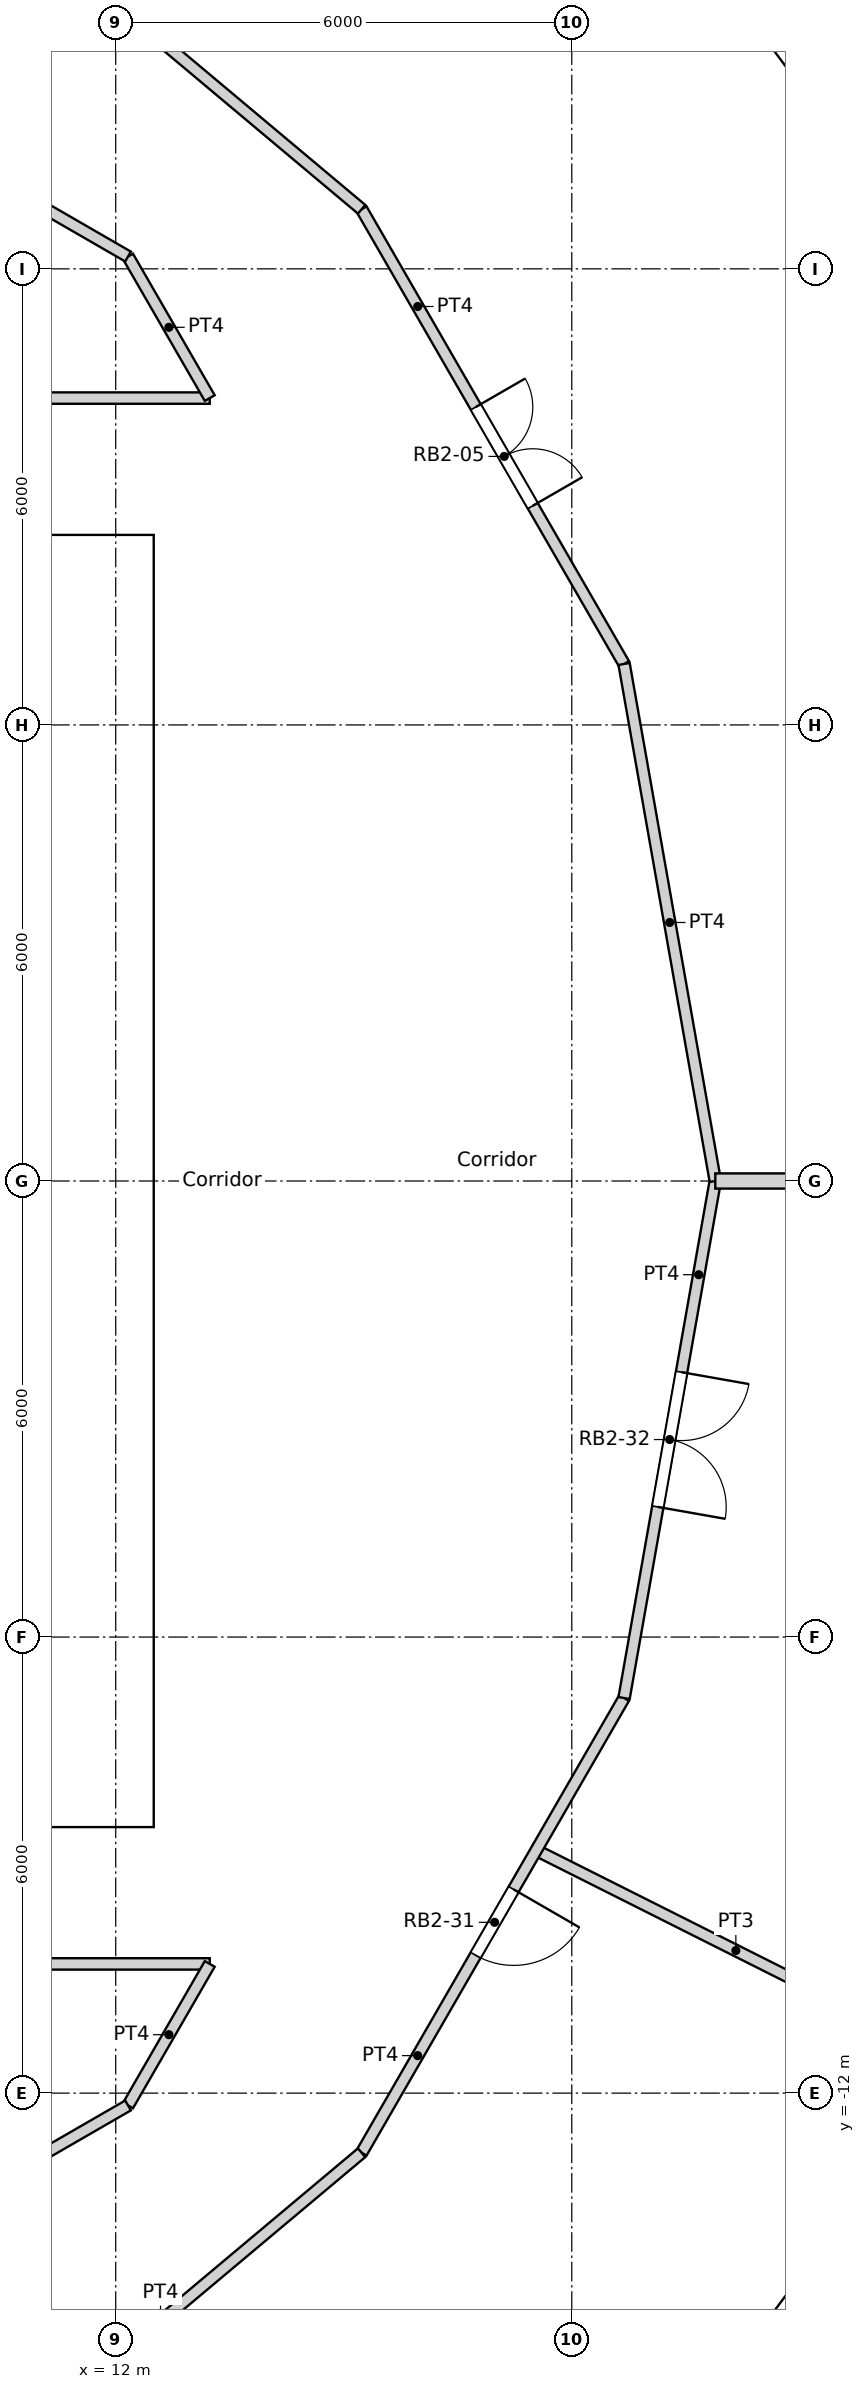
"""IFC4 building model, lengths in metres.
Left out: names, types, materials, properties, quantities, classifications, styles, units other than length and angle.
Written with IfcOpenShell. Run it as: python <this file> out.ifc"""

import sys

from ifc_helpers import new_model, si_unit, direction, frame, frame_2d, origin, origin_2d, place, context, subcontext, project, spatial, rectangle, circle, extrude, element, fill, save


model = new_model("IFC4")
c1 = context("Model", 3, precision=1e-05, world=origin(), true_north=direction((0.0, 1.0)))
c2 = subcontext(c1, "Body", "Model", "MODEL_VIEW")
j1 = project(units=[si_unit("LENGTHUNIT", "METRE"), si_unit("PLANEANGLEUNIT", "RADIAN")], contexts=[c1])
p1 = place(None, origin())
s1 = spatial("IfcSite", under=j1, at=p1, CompositionType="ELEMENT")
p2 = place(p1, origin())
s2 = spatial("IfcBuilding", under=s1, at=p2, CompositionType="ELEMENT")
p3 = place(p2, frame((0.0, 0.0, 136.8)))
s3 = spatial("IfcBuildingStorey", under=s2, at=p3, CompositionType="ELEMENT", Elevation=136.8)
for number, where, z_axis, x_axis in (
    (1, (18.822, 0.0, 0.0), (0.0, 0.0, 1.0), (1.0, 0.0, 0.0)),
    (2, (17.986, 5.548, 0.0), (0.0, 0.0, 1.0), (1.0, 0.0, 0.0)),
    (3, (15.552, 10.603, 0.0), (0.0, 0.0, 1.0), (1.0, 0.0, 0.0)),
    (4, (11.735, 14.716, 0.0), (0.0, 0.0, 1.0), (1.0, 0.0, 0.0)),
    (5, (11.735, -14.716, 0.0), (0.0, 0.0, 1.0), (1.0, 0.0, 0.0)),
    (6, (15.552, -10.603, 0.0), (0.0, 0.0, 1.0), (1.0, 0.0, 0.0)),
    (7, (17.986, -5.548, 0.0), (0.0, 0.0, 1.0), (1.0, 0.0, 0.0)),
):
    element("IfcColumn", number, at=place(p3, frame(where, z_axis=z_axis, x_axis=x_axis)), inside=s3, PredefinedType="COLUMN", context=c2, shape_type="SweptSolid", body=[
        extrude(circle(Radius=0.65, at=origin_2d()), origin(), (0.0, 0.0, 1.0), 3.6),
    ])
p4 = place(p3, frame((21.895, 14.43, -0.3), z_axis=(0.0, 0.0, 1.0), x_axis=(-0.597183717734, 0.802104486506, 0.0)))
e8 = element("IfcWall", 8, at=p4, inside=s3, PredefinedType="ELEMENTEDWALL", context=c2, shape_type="SweptSolid", body=[
    extrude(rectangle(XDim=3.0, YDim=1.45, at=frame_2d((1.5, 0.0))), origin(), (0.0, 0.0, 1.0), 3.6),
])
p5 = place(p4, frame((1.5, 0.0, 1.85)))
e9 = element("IfcOpeningElement", 9, at=p5, cuts=e8, PredefinedType="OPENING", context=c2, shape_type="SweptSolid", body=[
    extrude(circle(Radius=0.9, at=origin_2d()), frame((0.0, 0.735, 0.0), z_axis=(0.0, -1.0, 0.0), x_axis=(1.0, 0.0, 0.0)), (0.0, 0.0, 1.0), 1.47),
])
p6 = place(p3, frame((19.653, -16.478, 0.0), z_axis=(0.0, 0.0, 1.0), x_axis=(0.597197580538, 0.80209416517, 0.0)))
e10 = element("IfcWall", 10, at=p6, inside=s3, PredefinedType="SOLIDWALL", context=c2, shape_type="SweptSolid", body=[
    extrude(rectangle(XDim=2.973, YDim=0.3, at=frame_2d((1.486, 0.0))), origin(), (0.0, 0.0, 1.0), 2.8),
])
p7 = place(p6, frame((1.486, 0.0, 1.55)))
e11 = element("IfcOpeningElement", 11, at=p7, cuts=e10, PredefinedType="OPENING", context=c2, shape_type="SweptSolid", body=[
    extrude(circle(Radius=0.9, at=origin_2d()), frame((0.0, 0.16, 0.0), z_axis=(0.0, -1.0, 0.0), x_axis=(1.0, 0.0, 0.0)), (0.0, 0.0, 1.0), 0.32),
])
p8 = place(p3, frame((-12.5, -8.05, 0.0), z_axis=(0.0, 0.0, 1.0), x_axis=(1.0, 0.0, 0.0)))
e12 = element("IfcWall", 12, at=p8, inside=s3, PredefinedType="SOLIDWALL", context=c2, shape_type="SweptSolid", body=[
    extrude(rectangle(XDim=25.0, YDim=0.9, at=frame_2d((12.5, 0.0))), origin(), (0.0, 0.0, 1.0), 3.6),
])
p9 = place(p8, frame((13.4, 0.0, 0.0)))
e13 = element("IfcOpeningElement", 13, at=p9, cuts=e12, PredefinedType="OPENING", context=c2, shape_type="SweptSolid", body=[
    extrude(rectangle(XDim=1.0, YDim=2.1, at=frame_2d((0.5, 1.05))), frame((0.0, 0.45, 0.0), z_axis=(0.0, -1.0, 0.0), x_axis=(1.0, 0.0, 0.0)), (0.0, 0.0, 1.0), 0.9),
])
p10 = place(p8, frame((8.3, 0.0, 0.0)))
e14 = element("IfcOpeningElement", 14, at=p10, cuts=e12, PredefinedType="OPENING", context=c2, shape_type="SweptSolid", body=[
    extrude(rectangle(XDim=1.8, YDim=2.1, at=frame_2d((0.9, 1.05))), frame((0.0, 0.45, 0.0), z_axis=(0.0, -1.0, 0.0), x_axis=(1.0, 0.0, 0.0)), (0.0, 0.0, 1.0), 0.9),
])
p11 = place(p8, frame((14.9, 0.0, 0.0)))
e15 = element("IfcOpeningElement", 15, at=p11, cuts=e12, PredefinedType="OPENING", context=c2, shape_type="SweptSolid", body=[
    extrude(rectangle(XDim=1.8, YDim=2.1, at=frame_2d((0.9, 1.05))), frame((0.0, 0.45, 0.0), z_axis=(0.0, -1.0, 0.0), x_axis=(1.0, 0.0, 0.0)), (0.0, 0.0, 1.0), 0.9),
])
p12 = place(p3, frame((-12.5, 8.05, 0.0), z_axis=(0.0, 0.0, 1.0), x_axis=(1.0, 0.0, 0.0)))
e16 = element("IfcWall", 16, at=p12, inside=s3, PredefinedType="SOLIDWALL", context=c2, shape_type="SweptSolid", body=[
    extrude(rectangle(XDim=25.0, YDim=0.9, at=frame_2d((12.5, 0.0))), origin(), (0.0, 0.0, 1.0), 3.6),
])
p13 = place(p12, frame((8.3, 0.0, 0.0)))
e17 = element("IfcOpeningElement", 17, at=p13, cuts=e16, PredefinedType="OPENING", context=c2, shape_type="SweptSolid", body=[
    extrude(rectangle(XDim=1.8, YDim=2.1, at=frame_2d((0.9, 1.05))), frame((0.0, 0.45, 0.0), z_axis=(0.0, -1.0, 0.0), x_axis=(1.0, 0.0, 0.0)), (0.0, 0.0, 1.0), 0.9),
])
p14 = place(p3, frame((12.05, -7.6, 0.0), z_axis=(0.0, 0.0, 1.0), x_axis=(0.0, 1.0, 0.0)))
e18 = element("IfcWall", 18, at=p14, inside=s3, PredefinedType="SOLIDWALL", context=c2, shape_type="SweptSolid", body=[
    extrude(rectangle(XDim=15.2, YDim=0.9, at=frame_2d((7.6, 0.0))), origin(), (0.0, 0.0, 1.0), 3.6),
])
p15 = place(p14, frame((5.1, 0.0, 0.0)))
e19 = element("IfcOpeningElement", 19, at=p15, cuts=e18, PredefinedType="OPENING", context=c2, shape_type="SweptSolid", body=[
    extrude(rectangle(XDim=1.0, YDim=2.1, at=frame_2d((0.5, 1.05))), frame((0.0, 0.45, 0.0), z_axis=(0.0, -1.0, 0.0), x_axis=(1.0, 0.0, 0.0)), (0.0, 0.0, 1.0), 0.9),
])
p16 = place(p3, frame((9.2, -4.55, 0.0), z_axis=(0.0, 0.0, 1.0), x_axis=(1.0, 0.0, 0.0)))
e20 = element("IfcWall", 20, at=p16, inside=s3, PredefinedType="SOLIDWALL", context=c2, shape_type="SweptSolid", body=[
    extrude(rectangle(XDim=2.4, YDim=0.3, at=frame_2d((1.2, 0.0))), origin(), (0.0, 0.0, 1.0), 3.3),
])
p17 = place(p16, frame((0.65, 0.0, 0.0)))
e21 = element("IfcOpeningElement", 21, at=p17, cuts=e20, PredefinedType="OPENING", context=c2, shape_type="SweptSolid", body=[
    extrude(rectangle(XDim=1.1, YDim=2.1, at=frame_2d((0.55, 1.05))), frame((0.0, 0.15, 0.0), z_axis=(0.0, -1.0, 0.0), x_axis=(1.0, 0.0, 0.0)), (0.0, 0.0, 1.0), 0.3),
])
p18 = place(p3, frame((9.2, 4.55, 0.0), z_axis=(0.0, 0.0, 1.0), x_axis=(1.0, 0.0, 0.0)))
e22 = element("IfcWall", 22, at=p18, inside=s3, PredefinedType="SOLIDWALL", context=c2, shape_type="SweptSolid", body=[
    extrude(rectangle(XDim=2.4, YDim=0.3, at=frame_2d((1.2, 0.0))), origin(), (0.0, 0.0, 1.0), 3.3),
])
p19 = place(p18, frame((0.65, 0.0, 0.0)))
e23 = element("IfcOpeningElement", 23, at=p19, cuts=e22, PredefinedType="OPENING", context=c2, shape_type="SweptSolid", body=[
    extrude(rectangle(XDim=1.1, YDim=2.1, at=frame_2d((0.55, 1.05))), frame((0.0, 0.15, 0.0), z_axis=(0.0, -1.0, 0.0), x_axis=(1.0, 0.0, 0.0)), (0.0, 0.0, 1.0), 0.3),
])
p20 = place(p3, frame((-3.025, 10.3, 0.0), z_axis=(0.0, 0.0, 1.0), x_axis=(1.0, 0.0, 0.0)))
e24 = element("IfcWall", 24, at=p20, inside=s3, PredefinedType="PARTITIONING", context=c2, shape_type="SweptSolid", body=[
    extrude(rectangle(XDim=16.262, YDim=0.15, at=frame_2d((8.131, 0.0))), origin(), (0.0, 0.0, 1.0), 3.3),
])
p21 = place(p20, frame((7.288, 0.0, 0.0)))
e25 = element("IfcOpeningElement", 25, at=p21, cuts=e24, PredefinedType="OPENING", context=c2, shape_type="SweptSolid", body=[
    extrude(rectangle(XDim=0.95, YDim=2.1, at=frame_2d((0.475, 1.05))), frame((0.0, 0.075, 0.0), z_axis=(0.0, -1.0, 0.0), x_axis=(1.0, 0.0, 0.0)), (0.0, 0.0, 1.0), 0.15),
])
p22 = place(p3, frame((-3.025, -10.3, 0.0), z_axis=(0.0, 0.0, 1.0), x_axis=(1.0, 0.0, 0.0)))
e26 = element("IfcWall", 26, at=p22, inside=s3, PredefinedType="PARTITIONING", context=c2, shape_type="SweptSolid", body=[
    extrude(rectangle(XDim=16.262, YDim=0.15, at=frame_2d((8.131, 0.0))), origin(), (0.0, 0.0, 1.0), 3.3),
])
p23 = place(p22, frame((7.287, 0.0, 0.0)))
e27 = element("IfcOpeningElement", 27, at=p23, cuts=e26, PredefinedType="OPENING", context=c2, shape_type="SweptSolid", body=[
    extrude(rectangle(XDim=0.95, YDim=2.1, at=frame_2d((0.475, 1.05))), frame((0.0, 0.075, 0.0), z_axis=(0.0, -1.0, 0.0), x_axis=(1.0, 0.0, 0.0)), (0.0, 0.0, 1.0), 0.15),
])
for number, where, z_axis, x_axis in (
    (28, (12.162, 12.162, 0.0), (0.0, 0.0, 1.0), (0.5, -0.866, 0.0)),
    (29, (12.162, -12.162, 0.0), (0.0, 0.0, 1.0), (0.5, 0.866, 0.0)),
):
    element("IfcWall", number, at=place(p3, frame(where, z_axis=z_axis, x_axis=x_axis)), inside=s3, PredefinedType="PARTITIONING", context=c2, shape_type="SweptSolid", body=[
        extrude(rectangle(XDim=2.15, YDim=0.15, at=frame_2d((1.075, 0.0))), origin(), (0.0, 0.0, 1.0), 3.3),
    ])
p24 = place(p3, frame((9.943, 17.222, 0.0), z_axis=(0.0, 0.0, 1.0), x_axis=(0.766192104565, -0.642611592567, 0.0)))
e30 = element("IfcWall", 30, at=p24, inside=s3, PredefinedType="PARTITIONING", context=c2, shape_type="SweptSolid", body=[
    extrude(rectangle(XDim=6.906, YDim=0.15, at=frame_2d((3.453, 0.0))), origin(), (0.0, 0.0, 1.0), 3.3),
])
p25 = place(p3, frame((15.235, 12.784, 0.0), z_axis=(0.0, 0.0, 1.0), x_axis=(0.499914202267, -0.866074933462, 0.0)))
e31 = element("IfcWall", 31, at=p25, inside=s3, PredefinedType="PARTITIONING", context=c2, shape_type="SweptSolid", body=[
    extrude(rectangle(XDim=6.907, YDim=0.15, at=frame_2d((3.454, 0.0))), origin(), (0.0, 0.0, 1.0), 3.3),
])
p26 = place(p25, frame((3.004, 0.0, 0.0)))
e32 = element("IfcOpeningElement", 32, at=p26, cuts=e31, PredefinedType="OPENING", context=c2, shape_type="SweptSolid", body=[
    extrude(rectangle(XDim=1.5, YDim=2.1, at=frame_2d((0.75, 1.05))), frame((0.0, 0.075, 0.0), z_axis=(0.0, -1.0, 0.0), x_axis=(1.0, 0.0, 0.0)), (0.0, 0.0, 1.0), 0.15),
])
p27 = place(p3, frame((18.688, 6.802, 0.0), z_axis=(0.0, 0.0, 1.0), x_axis=(0.173728873845, -0.98479352069, 0.0)))
e33 = element("IfcWall", 33, at=p27, inside=s3, PredefinedType="PARTITIONING", context=c2, shape_type="SweptSolid", body=[
    extrude(rectangle(XDim=6.907, YDim=0.15, at=frame_2d((3.454, 0.0))), origin(), (0.0, 0.0, 1.0), 3.3),
])
p28 = place(p3, frame((15.235, -12.784, 0.0), z_axis=(0.0, 0.0, 1.0), x_axis=(0.499914202267, 0.866074933462, 0.0)))
e34 = element("IfcWall", 34, at=p28, inside=s3, PredefinedType="PARTITIONING", context=c2, shape_type="SweptSolid", body=[
    extrude(rectangle(XDim=6.907, YDim=0.15, at=frame_2d((3.454, 0.0))), origin(), (0.0, 0.0, 1.0), 3.3),
])
p29 = place(p28, frame((3.0, 0.0, 0.0)))
e35 = element("IfcOpeningElement", 35, at=p29, cuts=e34, PredefinedType="OPENING", context=c2, shape_type="SweptSolid", body=[
    extrude(rectangle(XDim=1.0, YDim=2.04, at=frame_2d((0.5, 1.02))), frame((0.0, 0.075, 0.0), z_axis=(0.0, -1.0, 0.0), x_axis=(1.0, 0.0, 0.0)), (0.0, 0.0, 1.0), 0.15),
])
p30 = place(p3, frame((9.943, -17.222, 0.0), z_axis=(0.0, 0.0, 1.0), x_axis=(0.766192104565, 0.642611592567, 0.0)))
e36 = element("IfcWall", 36, at=p30, inside=s3, PredefinedType="PARTITIONING", context=c2, shape_type="SweptSolid", body=[
    extrude(rectangle(XDim=6.906, YDim=0.15, at=frame_2d((3.453, 0.0))), origin(), (0.0, 0.0, 1.0), 3.3),
])
p31 = place(p3, frame((18.688, -6.802, 0.0), z_axis=(0.0, 0.0, 1.0), x_axis=(0.173728873845, 0.98479352069, 0.0)))
e37 = element("IfcWall", 37, at=p31, inside=s3, PredefinedType="PARTITIONING", context=c2, shape_type="SweptSolid", body=[
    extrude(rectangle(XDim=6.907, YDim=0.15, at=frame_2d((3.454, 0.0))), origin(), (0.0, 0.0, 1.0), 3.3),
])
p32 = place(p31, frame((2.553, 0.0, 0.0)))
e38 = element("IfcOpeningElement", 38, at=p32, cuts=e37, PredefinedType="OPENING", context=c2, shape_type="SweptSolid", body=[
    extrude(rectangle(XDim=1.8, YDim=2.1, at=frame_2d((0.9, 1.05))), frame((0.0, 0.075, 0.0), z_axis=(0.0, -1.0, 0.0), x_axis=(1.0, 0.0, 0.0)), (0.0, 0.0, 1.0), 0.15),
])
for number, where, z_axis, x_axis in (
    (39, (4.452, 16.614, 0.0), (0.0, 0.0, 1.0), (0.866, -0.5, 0.0)),
    (40, (4.452, -16.614, 0.0), (0.0, 0.0, 1.0), (0.866, 0.5, 0.0)),
):
    element("IfcWall", number, at=place(p3, frame(where, z_axis=z_axis, x_axis=x_axis)), inside=s3, PredefinedType="PARTITIONING", context=c2, shape_type="SweptSolid", body=[
        extrude(rectangle(XDim=8.903, YDim=0.15, at=frame_2d((4.452, 0.0))), origin(), (0.0, 0.0, 1.0), 3.3),
    ])
p33 = place(p3, frame((19.888, 0.0, 0.0), z_axis=(0.0, 0.0, 1.0), x_axis=(1.0, 0.0, 0.0)))
e41 = element("IfcWall", 41, at=p33, inside=s3, PredefinedType="PARTITIONING", context=c2, shape_type="SweptSolid", body=[
    extrude(rectangle(XDim=5.609, YDim=0.2, at=frame_2d((2.805, 0.0))), origin(), (0.0, 0.0, 1.0), 3.3),
])
p34 = place(p3, frame((17.532, -8.805, 0.0), z_axis=(0.0, 0.0, 1.0), x_axis=(0.893628331628, -0.448807759415, 0.0)))
e42 = element("IfcWall", 42, at=p34, inside=s3, PredefinedType="PARTITIONING", context=c2, shape_type="SweptSolid", body=[
    extrude(rectangle(XDim=5.878, YDim=0.15, at=frame_2d((2.939, 0.0))), origin(), (0.0, 0.0, 1.0), 3.3),
])
p35 = place(p5, origin())
e43 = element("IfcWindow", 43, at=p35, inside=s3, PartitioningType="SINGLE_PANEL", PredefinedType="WINDOW", context=c2, shape_type="SweptSolid", body=[
    extrude(circle(Radius=0.9, at=origin_2d()), frame((0.0, 0.695, 0.0), z_axis=(0.0, -1.0, 0.0), x_axis=(1.0, 0.0, 0.0)), (0.0, 0.0, 1.0), 0.1),
])
fill(e9, e43)
p36 = place(p7, origin())
e44 = element("IfcWindow", 44, at=p36, inside=s3, PartitioningType="SINGLE_PANEL", PredefinedType="WINDOW", context=c2, shape_type="SweptSolid", body=[
    extrude(circle(Radius=0.9, at=origin_2d()), frame((0.0, 0.12, 0.0), z_axis=(0.0, -1.0, 0.0), x_axis=(1.0, 0.0, 0.0)), (0.0, 0.0, 1.0), 0.1),
])
fill(e11, e44)
p37 = place(p15, origin())
e45 = element("IfcDoor", 45, at=p37, inside=s3, OperationType="DOUBLE_DOOR_SINGLE_SWING", PredefinedType="DOOR", context=c2, shape_type="SweptSolid", body=[
    extrude(rectangle(XDim=1.0, YDim=2.1, at=frame_2d((0.5, 1.05))), frame((0.0, 0.025, 0.0), z_axis=(0.0, -1.0, 0.0), x_axis=(1.0, 0.0, 0.0)), (0.0, 0.0, 1.0), 0.05),
])
fill(e19, e45)
p38 = place(p26, origin())
e46 = element("IfcDoor", 46, at=p38, inside=s3, OperationType="DOUBLE_DOOR_SINGLE_SWING", PredefinedType="DOOR", context=c2, shape_type="SweptSolid", body=[
    extrude(rectangle(XDim=1.5, YDim=2.1, at=frame_2d((0.75, 1.05))), frame((0.0, 0.025, 0.0), z_axis=(0.0, -1.0, 0.0), x_axis=(1.0, 0.0, 0.0)), (0.0, 0.0, 1.0), 0.05),
])
fill(e32, e46)
p39 = place(p29, origin())
e47 = element("IfcDoor", 47, at=p39, inside=s3, OperationType="SINGLE_SWING_LEFT", PredefinedType="DOOR", context=c2, shape_type="SweptSolid", body=[
    extrude(rectangle(XDim=1.0, YDim=2.04, at=frame_2d((0.5, 1.02))), frame((0.0, 0.025, 0.0), z_axis=(0.0, -1.0, 0.0), x_axis=(1.0, 0.0, 0.0)), (0.0, 0.0, 1.0), 0.05),
])
fill(e35, e47)
p40 = place(p32, origin())
e48 = element("IfcDoor", 48, at=p40, inside=s3, OperationType="DOUBLE_DOOR_SINGLE_SWING", PredefinedType="DOOR", context=c2, shape_type="SweptSolid", body=[
    extrude(rectangle(XDim=1.8, YDim=2.1, at=frame_2d((0.9, 1.05))), frame((0.0, 0.025, 0.0), z_axis=(0.0, -1.0, 0.0), x_axis=(1.0, 0.0, 0.0)), (0.0, 0.0, 1.0), 0.05),
])
fill(e38, e48)
save(model, sys.argv[1])
